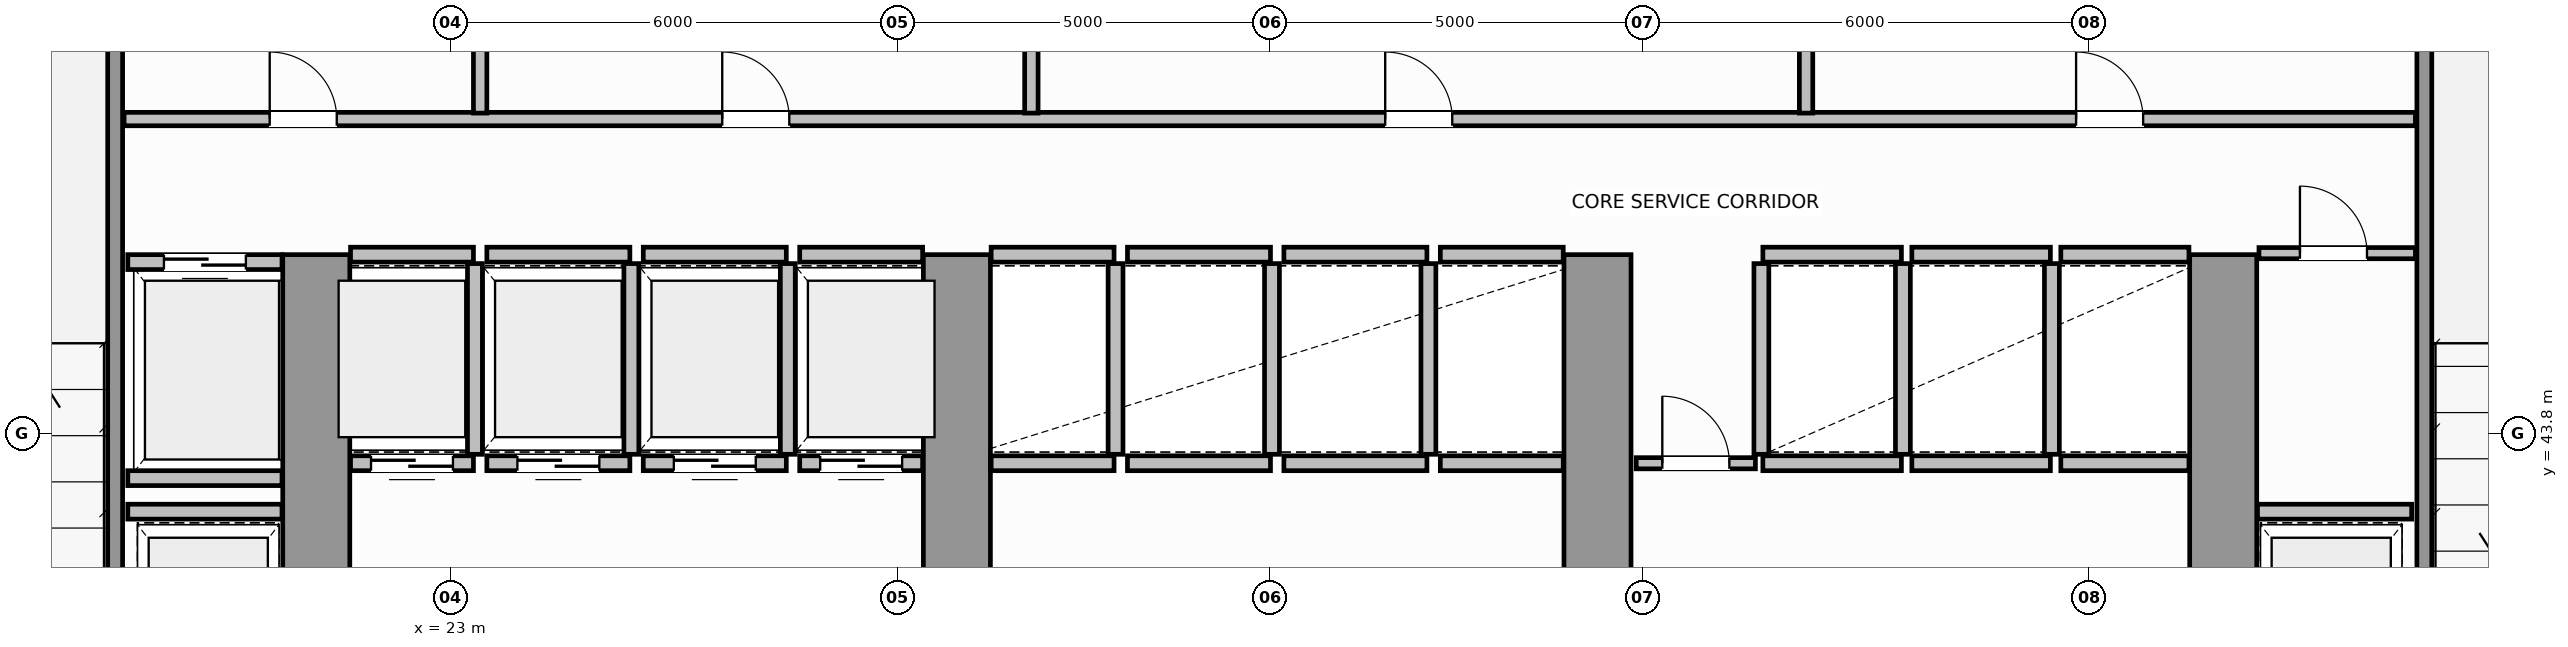
"""IFC4 building model, lengths in metres.
Left out: names, types, materials, properties, quantities, classifications, styles, units other than length and angle.
Written with IfcOpenShell. Run it as: python <this file> out.ifc"""

import sys

from ifc_helpers import new_model, si_unit, direction, frame, frame_2d, origin, place, context, subcontext, project, spatial, rectangle, extrude, source, transform, mapped, element, fill, save


model = new_model("IFC4")
c1 = context("Model", 3, precision=1e-05, world=origin(), true_north=direction((0.0, 1.0)))
c2 = subcontext(c1, "Body", "Model", "MODEL_VIEW")
j1 = project(units=[si_unit("LENGTHUNIT", "METRE"), si_unit("PLANEANGLEUNIT", "RADIAN")], contexts=[c1])
p1 = place(None, origin())
s1 = spatial("IfcSite", under=j1, at=p1, CompositionType="ELEMENT")
p2 = place(p1, origin())
s2 = spatial("IfcBuilding", under=s1, at=p2, CompositionType="ELEMENT")
p3 = place(p2, frame((0.0, 0.0, 37.8)))
s3 = spatial("IfcBuildingStorey", under=s2, at=p3, CompositionType="ELEMENT", Elevation=37.8)
for number, where, z_axis, x_axis in (
    (1, (21.2, 36.97, 0.0), (0.0, 0.0, 1.0), (0.0, 1.0, 0.0)),
    (2, (29.8, 36.97, 0.0), (0.0, 0.0, 1.0), (0.0, 1.0, 0.0)),
    (3, (38.4, 36.97, 0.0), (0.0, 0.0, 1.0), (0.0, 1.0, 0.0)),
    (4, (46.8, 36.97, 0.0), (0.0, 0.0, 1.0), (0.0, 1.0, 0.0)),
):
    element("IfcWall", number, at=place(p3, frame(where, z_axis=z_axis, x_axis=x_axis)), inside=s3, PredefinedType="SHEAR", context=c2, shape_type="SweptSolid", body=[
        extrude(rectangle(XDim=9.23, YDim=0.9, at=frame_2d((4.615, 0.0))), origin(), (0.0, 0.0, 1.0), 3.8),
    ])
for number, where, z_axis, x_axis in (
    (5, (18.5, 39.96, 0.0), (0.0, 0.0, 1.0), (0.0, 1.0, 0.0)),
    (6, (49.5, 39.96, 0.0), (0.0, 0.0, 1.0), (0.0, 1.0, 0.0)),
):
    element("IfcWall", number, at=place(p3, frame(where, z_axis=z_axis, x_axis=x_axis)), inside=s3, PredefinedType="SOLIDWALL", context=c2, shape_type="SweptSolid", body=[
        extrude(rectangle(XDim=9.93, YDim=0.2, at=frame_2d((4.965, 0.0))), origin(), (0.0, 0.0, 1.0), 3.8),
    ])
p4 = place(p3, frame((21.66, 43.4, 0.0), z_axis=(0.0, 0.0, 1.0), x_axis=(1.0, 0.0, 0.0)))
e7 = element("IfcWall", 7, at=p4, inside=s3, PredefinedType="SOLIDWALL", context=c2, shape_type="SweptSolid", body=[
    extrude(rectangle(XDim=1.65, YDim=0.2, at=frame_2d((0.825, 0.0))), origin(), (0.0, 0.0, 1.0), 3.58),
])
p5 = place(p4, frame((0.275, 0.0, 0.0)))
e8 = element("IfcOpeningElement", 8, at=p5, cuts=e7, PredefinedType="OPENING", context=c2, shape_type="SweptSolid", body=[
    extrude(rectangle(XDim=1.1, YDim=2.15, at=frame_2d((0.55, 1.075))), frame((0.0, 0.11, 0.0), z_axis=(0.0, -1.0, 0.0), x_axis=(1.0, 0.0, 0.0)), (0.0, 0.0, 1.0), 0.22),
])
p6 = place(p3, frame((21.66, 46.2, 0.0), z_axis=(0.0, 0.0, 1.0), x_axis=(1.0, 0.0, 0.0)))
e9 = element("IfcWall", 9, at=p6, inside=s3, PredefinedType="SOLIDWALL", context=c2, shape_type="SweptSolid", body=[
    extrude(rectangle(XDim=1.65, YDim=0.2, at=frame_2d((0.825, 0.0))), origin(), (0.0, 0.0, 1.0), 3.58),
])
p7 = place(p3, frame((23.33, 43.52, 0.0), z_axis=(0.0, 0.0, 1.0), x_axis=(0.0, 1.0, 0.0)))
e10 = element("IfcWall", 10, at=p7, inside=s3, PredefinedType="SOLIDWALL", context=c2, shape_type="SweptSolid", body=[
    extrude(rectangle(XDim=2.56, YDim=0.2, at=frame_2d((1.28, 0.0))), origin(), (0.0, 0.0, 1.0), 3.58),
])
p8 = place(p3, frame((23.49, 43.4, 0.0), z_axis=(0.0, 0.0, 1.0), x_axis=(1.0, 0.0, 0.0)))
e11 = element("IfcWall", 11, at=p8, inside=s3, PredefinedType="SOLIDWALL", context=c2, shape_type="SweptSolid", body=[
    extrude(rectangle(XDim=1.92, YDim=0.2, at=frame_2d((0.96, 0.0))), origin(), (0.0, 0.0, 1.0), 3.58),
])
p9 = place(p8, frame((0.41, 0.0, 0.0)))
e12 = element("IfcOpeningElement", 12, at=p9, cuts=e11, PredefinedType="OPENING", context=c2, shape_type="SweptSolid", body=[
    extrude(rectangle(XDim=1.1, YDim=2.15, at=frame_2d((0.55, 1.075))), frame((0.0, 0.11, 0.0), z_axis=(0.0, -1.0, 0.0), x_axis=(1.0, 0.0, 0.0)), (0.0, 0.0, 1.0), 0.22),
])
p10 = place(p3, frame((23.49, 46.2, 0.0), z_axis=(0.0, 0.0, 1.0), x_axis=(1.0, 0.0, 0.0)))
e13 = element("IfcWall", 13, at=p10, inside=s3, PredefinedType="SOLIDWALL", context=c2, shape_type="SweptSolid", body=[
    extrude(rectangle(XDim=1.92, YDim=0.2, at=frame_2d((0.96, 0.0))), origin(), (0.0, 0.0, 1.0), 3.58),
])
p11 = place(p3, frame((25.43, 43.52, 0.0), z_axis=(0.0, 0.0, 1.0), x_axis=(0.0, 1.0, 0.0)))
e14 = element("IfcWall", 14, at=p11, inside=s3, PredefinedType="SOLIDWALL", context=c2, shape_type="SweptSolid", body=[
    extrude(rectangle(XDim=2.56, YDim=0.2, at=frame_2d((1.28, 0.0))), origin(), (0.0, 0.0, 1.0), 3.58),
])
p12 = place(p3, frame((25.59, 43.4, 0.0), z_axis=(0.0, 0.0, 1.0), x_axis=(1.0, 0.0, 0.0)))
e15 = element("IfcWall", 15, at=p12, inside=s3, PredefinedType="SOLIDWALL", context=c2, shape_type="SweptSolid", body=[
    extrude(rectangle(XDim=1.92, YDim=0.2, at=frame_2d((0.96, 0.0))), origin(), (0.0, 0.0, 1.0), 3.58),
])
p13 = place(p12, frame((0.41, 0.0, 0.0)))
e16 = element("IfcOpeningElement", 16, at=p13, cuts=e15, PredefinedType="OPENING", context=c2, shape_type="SweptSolid", body=[
    extrude(rectangle(XDim=1.1, YDim=2.15, at=frame_2d((0.55, 1.075))), frame((0.0, 0.11, 0.0), z_axis=(0.0, -1.0, 0.0), x_axis=(1.0, 0.0, 0.0)), (0.0, 0.0, 1.0), 0.22),
])
p14 = place(p3, frame((25.59, 46.2, 0.0), z_axis=(0.0, 0.0, 1.0), x_axis=(1.0, 0.0, 0.0)))
e17 = element("IfcWall", 17, at=p14, inside=s3, PredefinedType="SOLIDWALL", context=c2, shape_type="SweptSolid", body=[
    extrude(rectangle(XDim=1.92, YDim=0.2, at=frame_2d((0.96, 0.0))), origin(), (0.0, 0.0, 1.0), 3.58),
])
p15 = place(p3, frame((27.53, 43.52, 0.0), z_axis=(0.0, 0.0, 1.0), x_axis=(0.0, 1.0, 0.0)))
e18 = element("IfcWall", 18, at=p15, inside=s3, PredefinedType="SOLIDWALL", context=c2, shape_type="SweptSolid", body=[
    extrude(rectangle(XDim=2.56, YDim=0.2, at=frame_2d((1.28, 0.0))), origin(), (0.0, 0.0, 1.0), 3.58),
])
p16 = place(p3, frame((27.69, 43.4, 0.0), z_axis=(0.0, 0.0, 1.0), x_axis=(1.0, 0.0, 0.0)))
e19 = element("IfcWall", 19, at=p16, inside=s3, PredefinedType="SOLIDWALL", context=c2, shape_type="SweptSolid", body=[
    extrude(rectangle(XDim=1.65, YDim=0.2, at=frame_2d((0.825, 0.0))), origin(), (0.0, 0.0, 1.0), 3.58),
])
p17 = place(p16, frame((0.275, 0.0, 0.0)))
e20 = element("IfcOpeningElement", 20, at=p17, cuts=e19, PredefinedType="OPENING", context=c2, shape_type="SweptSolid", body=[
    extrude(rectangle(XDim=1.1, YDim=2.15, at=frame_2d((0.55, 1.075))), frame((0.0, 0.11, 0.0), z_axis=(0.0, -1.0, 0.0), x_axis=(1.0, 0.0, 0.0)), (0.0, 0.0, 1.0), 0.22),
])
p18 = place(p3, frame((27.69, 46.2, 0.0), z_axis=(0.0, 0.0, 1.0), x_axis=(1.0, 0.0, 0.0)))
e21 = element("IfcWall", 21, at=p18, inside=s3, PredefinedType="SOLIDWALL", context=c2, shape_type="SweptSolid", body=[
    extrude(rectangle(XDim=1.65, YDim=0.2, at=frame_2d((0.825, 0.0))), origin(), (0.0, 0.0, 1.0), 3.58),
])
for number, where, z_axis, x_axis in (
    (22, (30.26, 43.4, 0.0), (0.0, 0.0, 1.0), (1.0, 0.0, 0.0)),
    (23, (30.26, 46.2, 0.0), (0.0, 0.0, 1.0), (1.0, 0.0, 0.0)),
):
    element("IfcWall", number, at=place(p3, frame(where, z_axis=z_axis, x_axis=x_axis)), inside=s3, PredefinedType="SOLIDWALL", context=c2, shape_type="SweptSolid", body=[
        extrude(rectangle(XDim=1.65, YDim=0.2, at=frame_2d((0.825, 0.0))), origin(), (0.0, 0.0, 1.0), 3.58),
    ])
p19 = place(p3, frame((31.93, 43.52, 0.0), z_axis=(0.0, 0.0, 1.0), x_axis=(0.0, 1.0, 0.0)))
e24 = element("IfcWall", 24, at=p19, inside=s3, PredefinedType="SOLIDWALL", context=c2, shape_type="SweptSolid", body=[
    extrude(rectangle(XDim=2.56, YDim=0.2, at=frame_2d((1.28, 0.0))), origin(), (0.0, 0.0, 1.0), 3.58),
])
for number, where, z_axis, x_axis in (
    (25, (32.09, 43.4, 0.0), (0.0, 0.0, 1.0), (1.0, 0.0, 0.0)),
    (26, (32.09, 46.2, 0.0), (0.0, 0.0, 1.0), (1.0, 0.0, 0.0)),
):
    element("IfcWall", number, at=place(p3, frame(where, z_axis=z_axis, x_axis=x_axis)), inside=s3, PredefinedType="SOLIDWALL", context=c2, shape_type="SweptSolid", body=[
        extrude(rectangle(XDim=1.92, YDim=0.2, at=frame_2d((0.96, 0.0))), origin(), (0.0, 0.0, 1.0), 3.58),
    ])
p20 = place(p3, frame((34.03, 43.52, 0.0), z_axis=(0.0, 0.0, 1.0), x_axis=(0.0, 1.0, 0.0)))
e27 = element("IfcWall", 27, at=p20, inside=s3, PredefinedType="SOLIDWALL", context=c2, shape_type="SweptSolid", body=[
    extrude(rectangle(XDim=2.56, YDim=0.2, at=frame_2d((1.28, 0.0))), origin(), (0.0, 0.0, 1.0), 3.58),
])
for number, where, z_axis, x_axis in (
    (28, (34.19, 43.4, 0.0), (0.0, 0.0, 1.0), (1.0, 0.0, 0.0)),
    (29, (34.19, 46.2, 0.0), (0.0, 0.0, 1.0), (1.0, 0.0, 0.0)),
):
    element("IfcWall", number, at=place(p3, frame(where, z_axis=z_axis, x_axis=x_axis)), inside=s3, PredefinedType="SOLIDWALL", context=c2, shape_type="SweptSolid", body=[
        extrude(rectangle(XDim=1.92, YDim=0.2, at=frame_2d((0.96, 0.0))), origin(), (0.0, 0.0, 1.0), 3.58),
    ])
p21 = place(p3, frame((36.13, 43.52, 0.0), z_axis=(0.0, 0.0, 1.0), x_axis=(0.0, 1.0, 0.0)))
e30 = element("IfcWall", 30, at=p21, inside=s3, PredefinedType="SOLIDWALL", context=c2, shape_type="SweptSolid", body=[
    extrude(rectangle(XDim=2.56, YDim=0.2, at=frame_2d((1.28, 0.0))), origin(), (0.0, 0.0, 1.0), 3.58),
])
for number, where, z_axis, x_axis in (
    (31, (36.29, 43.4, 0.0), (0.0, 0.0, 1.0), (1.0, 0.0, 0.0)),
    (32, (36.29, 46.2, 0.0), (0.0, 0.0, 1.0), (1.0, 0.0, 0.0)),
):
    element("IfcWall", number, at=place(p3, frame(where, z_axis=z_axis, x_axis=x_axis)), inside=s3, PredefinedType="SOLIDWALL", context=c2, shape_type="SweptSolid", body=[
        extrude(rectangle(XDim=1.65, YDim=0.2, at=frame_2d((0.825, 0.0))), origin(), (0.0, 0.0, 1.0), 3.58),
    ])
for number, where, z_axis, x_axis in (
    (33, (40.62, 43.4, 0.0), (0.0, 0.0, 1.0), (1.0, 0.0, 0.0)),
    (34, (40.62, 46.2, 0.0), (0.0, 0.0, 1.0), (1.0, 0.0, 0.0)),
):
    element("IfcWall", number, at=place(p3, frame(where, z_axis=z_axis, x_axis=x_axis)), inside=s3, PredefinedType="SOLIDWALL", context=c2, shape_type="SweptSolid", body=[
        extrude(rectangle(XDim=1.86, YDim=0.2, at=frame_2d((0.93, 0.0))), origin(), (0.0, 0.0, 1.0), 3.58),
    ])
for number, where, z_axis, x_axis in (
    (35, (40.6, 43.52, 0.0), (0.0, 0.0, 1.0), (0.0, 1.0, 0.0)),
    (36, (42.5, 43.52, 0.0), (0.0, 0.0, 1.0), (0.0, 1.0, 0.0)),
):
    element("IfcWall", number, at=place(p3, frame(where, z_axis=z_axis, x_axis=x_axis)), inside=s3, PredefinedType="SOLIDWALL", context=c2, shape_type="SweptSolid", body=[
        extrude(rectangle(XDim=2.56, YDim=0.2, at=frame_2d((1.28, 0.0))), origin(), (0.0, 0.0, 1.0), 3.58),
    ])
for number, where, z_axis, x_axis in (
    (37, (42.62, 43.4, 0.0), (0.0, 0.0, 1.0), (1.0, 0.0, 0.0)),
    (38, (42.62, 46.2, 0.0), (0.0, 0.0, 1.0), (1.0, 0.0, 0.0)),
):
    element("IfcWall", number, at=place(p3, frame(where, z_axis=z_axis, x_axis=x_axis)), inside=s3, PredefinedType="SOLIDWALL", context=c2, shape_type="SweptSolid", body=[
        extrude(rectangle(XDim=1.86, YDim=0.2, at=frame_2d((0.93, 0.0))), origin(), (0.0, 0.0, 1.0), 3.58),
    ])
p22 = place(p3, frame((44.5, 43.52, 0.0), z_axis=(0.0, 0.0, 1.0), x_axis=(0.0, 1.0, 0.0)))
e39 = element("IfcWall", 39, at=p22, inside=s3, PredefinedType="SOLIDWALL", context=c2, shape_type="SweptSolid", body=[
    extrude(rectangle(XDim=2.56, YDim=0.2, at=frame_2d((1.28, 0.0))), origin(), (0.0, 0.0, 1.0), 3.58),
])
for number, where, z_axis, x_axis in (
    (40, (44.62, 43.4, 0.0), (0.0, 0.0, 1.0), (1.0, 0.0, 0.0)),
    (41, (44.62, 46.2, 0.0), (0.0, 0.0, 1.0), (1.0, 0.0, 0.0)),
):
    element("IfcWall", number, at=place(p3, frame(where, z_axis=z_axis, x_axis=x_axis)), inside=s3, PredefinedType="SOLIDWALL", context=c2, shape_type="SweptSolid", body=[
        extrude(rectangle(XDim=1.72, YDim=0.2, at=frame_2d((0.86, 0.0))), origin(), (0.0, 0.0, 1.0), 3.58),
    ])
p23 = place(p3, frame((18.67, 46.1, 0.0), z_axis=(0.0, 0.0, 1.0), x_axis=(1.0, 0.0, 0.0)))
e42 = element("IfcWall", 42, at=p23, inside=s3, PredefinedType="SOLIDWALL", context=c2, shape_type="SweptSolid", body=[
    extrude(rectangle(XDim=2.07, YDim=0.2, at=frame_2d((1.035, 0.0))), origin(), (0.0, 0.0, 1.0), 3.58),
])
p24 = place(p23, frame((0.485, 0.0, 0.0)))
e43 = element("IfcOpeningElement", 43, at=p24, cuts=e42, PredefinedType="OPENING", context=c2, shape_type="SweptSolid", body=[
    extrude(rectangle(XDim=1.1, YDim=2.15, at=frame_2d((0.55, 1.075))), frame((0.0, 0.11, 0.0), z_axis=(0.0, -1.0, 0.0), x_axis=(1.0, 0.0, 0.0)), (0.0, 0.0, 1.0), 0.22),
])
for number, where, z_axis, x_axis in (
    (44, (18.67, 43.2, 0.0), (0.0, 0.0, 1.0), (1.0, 0.0, 0.0)),
    (45, (18.67, 42.75, 0.0), (0.0, 0.0, 1.0), (1.0, 0.0, 0.0)),
    (46, (47.26, 42.75, 0.0), (0.0, 0.0, 1.0), (1.0, 0.0, 0.0)),
):
    element("IfcWall", number, at=place(p3, frame(where, z_axis=z_axis, x_axis=x_axis)), inside=s3, PredefinedType="SOLIDWALL", context=c2, shape_type="SweptSolid", body=[
        extrude(rectangle(XDim=2.07, YDim=0.2, at=frame_2d((1.035, 0.0))), origin(), (0.0, 0.0, 1.0), 3.58),
    ])
p25 = place(p3, frame((47.28, 46.22, 0.0), z_axis=(0.0, 0.0, 1.0), x_axis=(1.0, 0.0, 0.0)))
e47 = element("IfcWall", 47, at=p25, inside=s3, PredefinedType="PARTITIONING", context=c2, shape_type="SweptSolid", body=[
    extrude(rectangle(XDim=2.1, YDim=0.15, at=frame_2d((1.05, 0.0))), origin(), (0.0, 0.0, 1.0), 3.58),
])
p26 = place(p25, frame((0.55, 0.0, 0.0)))
e48 = element("IfcOpeningElement", 48, at=p26, cuts=e47, PredefinedType="OPENING", context=c2, shape_type="SweptSolid", body=[
    extrude(rectangle(XDim=0.9, YDim=2.1, at=frame_2d((0.45, 1.05))), frame((0.0, 0.085, 0.0), z_axis=(0.0, -1.0, 0.0), x_axis=(1.0, 0.0, 0.0)), (0.0, 0.0, 1.0), 0.17),
])
p27 = place(p3, frame((38.92, 43.4, 0.0), z_axis=(0.0, 0.0, 1.0), x_axis=(1.0, 0.0, 0.0)))
e49 = element("IfcWall", 49, at=p27, inside=s3, PredefinedType="PARTITIONING", context=c2, shape_type="SweptSolid", body=[
    extrude(rectangle(XDim=1.6, YDim=0.15, at=frame_2d((0.8, 0.0))), origin(), (0.0, 0.0, 1.0), 3.58),
])
p28 = place(p27, frame((0.35, 0.0, 0.0)))
e50 = element("IfcOpeningElement", 50, at=p28, cuts=e49, PredefinedType="OPENING", context=c2, shape_type="SweptSolid", body=[
    extrude(rectangle(XDim=0.9, YDim=2.1, at=frame_2d((0.45, 1.05))), frame((0.0, 0.085, 0.0), z_axis=(0.0, -1.0, 0.0), x_axis=(1.0, 0.0, 0.0)), (0.0, 0.0, 1.0), 0.17),
])
p29 = place(p3, frame((18.62, 48.02, 0.0), z_axis=(0.0, 0.0, 1.0), x_axis=(1.0, 0.0, 0.0)))
e51 = element("IfcWall", 51, at=p29, inside=s3, PredefinedType="PLUMBINGWALL", context=c2, shape_type="SweptSolid", body=[
    extrude(rectangle(XDim=30.76, YDim=0.18, at=frame_2d((15.38, 0.0))), origin(), (0.0, 0.0, 1.0), 3.58),
])
p30 = place(p29, frame((1.955, 0.0, 0.0)))
e52 = element("IfcOpeningElement", 52, at=p30, cuts=e51, PredefinedType="OPENING", context=c2, shape_type="SweptSolid", body=[
    extrude(rectangle(XDim=0.9, YDim=2.15, at=frame_2d((0.45, 1.075))), frame((0.0, 0.1, 0.0), z_axis=(0.0, -1.0, 0.0), x_axis=(1.0, 0.0, 0.0)), (0.0, 0.0, 1.0), 0.2),
])
p31 = place(p29, frame((8.03, 0.0, 0.0)))
e53 = element("IfcOpeningElement", 53, at=p31, cuts=e51, PredefinedType="OPENING", context=c2, shape_type="SweptSolid", body=[
    extrude(rectangle(XDim=0.9, YDim=2.15, at=frame_2d((0.45, 1.075))), frame((0.0, 0.1, 0.0), z_axis=(0.0, -1.0, 0.0), x_axis=(1.0, 0.0, 0.0)), (0.0, 0.0, 1.0), 0.2),
])
p32 = place(p29, frame((16.93, 0.0, 0.0)))
e54 = element("IfcOpeningElement", 54, at=p32, cuts=e51, PredefinedType="OPENING", context=c2, shape_type="SweptSolid", body=[
    extrude(rectangle(XDim=0.9, YDim=2.15, at=frame_2d((0.45, 1.075))), frame((0.0, 0.1, 0.0), z_axis=(0.0, -1.0, 0.0), x_axis=(1.0, 0.0, 0.0)), (0.0, 0.0, 1.0), 0.2),
])
p33 = place(p29, frame((26.205, 0.0, 0.0)))
e55 = element("IfcOpeningElement", 55, at=p33, cuts=e51, PredefinedType="OPENING", context=c2, shape_type="SweptSolid", body=[
    extrude(rectangle(XDim=0.9, YDim=2.15, at=frame_2d((0.45, 1.075))), frame((0.0, 0.1, 0.0), z_axis=(0.0, -1.0, 0.0), x_axis=(1.0, 0.0, 0.0)), (0.0, 0.0, 1.0), 0.2),
])
for number, where, z_axis, x_axis in (
    (56, (23.4, 48.1, 0.0), (0.0, 0.0, 1.0), (0.0, 1.0, 0.0)),
    (57, (30.8, 48.1, 0.0), (0.0, 0.0, 1.0), (0.0, 1.0, 0.0)),
    (58, (41.2, 48.1, 0.0), (0.0, 0.0, 1.0), (0.0, 1.0, 0.0)),
):
    element("IfcWall", number, at=place(p3, frame(where, z_axis=z_axis, x_axis=x_axis)), inside=s3, PredefinedType="PLUMBINGWALL", context=c2, shape_type="SweptSolid", body=[
        extrude(rectangle(XDim=1.98, YDim=0.18, at=frame_2d((0.99, 0.0))), origin(), (0.0, 0.0, 1.0), 3.58),
    ])
m1 = source(origin(), c2, "Body", "SweptSolid", [
    extrude(rectangle(XDim=1.1, YDim=2.15, at=frame_2d((0.55, 1.075))), frame((0.0, 0.025, 0.0), z_axis=(0.0, -1.0, 0.0), x_axis=(1.0, 0.0, 0.0)), (0.0, 0.0, 1.0), 0.05),
])
p34 = place(p5, origin())
e59 = element("IfcDoor", 59, at=p34, inside=s3, OperationType="DOUBLE_DOOR_SLIDING", PredefinedType="DOOR", context=c2, shape_type="MappedRepresentation", body=[
    mapped(m1, transform((0.0, 0.0, 0.0), scale=1.0)),
])
fill(e8, e59)
p35 = place(p9, origin())
e60 = element("IfcDoor", 60, at=p35, inside=s3, OperationType="DOUBLE_DOOR_SLIDING", PredefinedType="DOOR", context=c2, shape_type="MappedRepresentation", body=[
    mapped(m1, transform((0.0, 0.0, 0.0), scale=1.0)),
])
fill(e12, e60)
p36 = place(p13, origin())
e61 = element("IfcDoor", 61, at=p36, inside=s3, OperationType="DOUBLE_DOOR_SLIDING", PredefinedType="DOOR", context=c2, shape_type="MappedRepresentation", body=[
    mapped(m1, transform((0.0, 0.0, 0.0), scale=1.0)),
])
fill(e16, e61)
p37 = place(p17, origin())
e62 = element("IfcDoor", 62, at=p37, inside=s3, OperationType="DOUBLE_DOOR_SLIDING", PredefinedType="DOOR", context=c2, shape_type="MappedRepresentation", body=[
    mapped(m1, transform((0.0, 0.0, 0.0), scale=1.0)),
])
fill(e20, e62)
p38 = place(p24, origin())
e63 = element("IfcDoor", 63, at=p38, inside=s3, OperationType="DOUBLE_DOOR_SLIDING", PredefinedType="DOOR", context=c2, shape_type="MappedRepresentation", body=[
    mapped(m1, transform((0.0, 0.0, 0.0), scale=1.0)),
])
fill(e43, e63)
m2 = source(origin(), c2, "Body", "SweptSolid", [
    extrude(rectangle(XDim=0.9, YDim=2.1, at=frame_2d((0.45, 1.05))), frame((0.0, 0.025, 0.0), z_axis=(0.0, -1.0, 0.0), x_axis=(1.0, 0.0, 0.0)), (0.0, 0.0, 1.0), 0.05),
])
p39 = place(p26, origin())
e64 = element("IfcDoor", 64, at=p39, inside=s3, OperationType="SINGLE_SWING_RIGHT", PredefinedType="DOOR", context=c2, shape_type="MappedRepresentation", body=[
    mapped(m2, transform((0.0, 0.0, 0.0), scale=1.0)),
])
fill(e48, e64)
p40 = place(p28, origin())
e65 = element("IfcDoor", 65, at=p40, inside=s3, OperationType="SINGLE_SWING_LEFT", PredefinedType="DOOR", context=c2, shape_type="MappedRepresentation", body=[
    mapped(m2, transform((0.0, 0.0, 0.0), scale=1.0)),
])
fill(e50, e65)
m3 = source(origin(), c2, "Body", "SweptSolid", [
    extrude(rectangle(XDim=0.9, YDim=2.15, at=frame_2d((0.45, 1.075))), frame((0.0, 0.025, 0.0), z_axis=(0.0, -1.0, 0.0), x_axis=(1.0, 0.0, 0.0)), (0.0, 0.0, 1.0), 0.05),
])
p41 = place(p30, origin())
e66 = element("IfcDoor", 66, at=p41, inside=s3, OperationType="SINGLE_SWING_LEFT", PredefinedType="DOOR", context=c2, shape_type="MappedRepresentation", body=[
    mapped(m3, transform((0.0, 0.0, 0.0), scale=1.0)),
])
fill(e52, e66)
p42 = place(p31, origin())
e67 = element("IfcDoor", 67, at=p42, inside=s3, OperationType="SINGLE_SWING_RIGHT", PredefinedType="DOOR", context=c2, shape_type="MappedRepresentation", body=[
    mapped(m3, transform((0.0, 0.0, 0.0), scale=1.0)),
])
fill(e53, e67)
p43 = place(p32, origin())
e68 = element("IfcDoor", 68, at=p43, inside=s3, OperationType="SINGLE_SWING_LEFT", PredefinedType="DOOR", context=c2, shape_type="MappedRepresentation", body=[
    mapped(m3, transform((0.0, 0.0, 0.0), scale=1.0)),
])
fill(e54, e68)
p44 = place(p33, origin())
e69 = element("IfcDoor", 69, at=p44, inside=s3, OperationType="SINGLE_SWING_RIGHT", PredefinedType="DOOR", context=c2, shape_type="MappedRepresentation", body=[
    mapped(m3, transform((0.0, 0.0, 0.0), scale=1.0)),
])
fill(e55, e69)
save(model, sys.argv[1])
